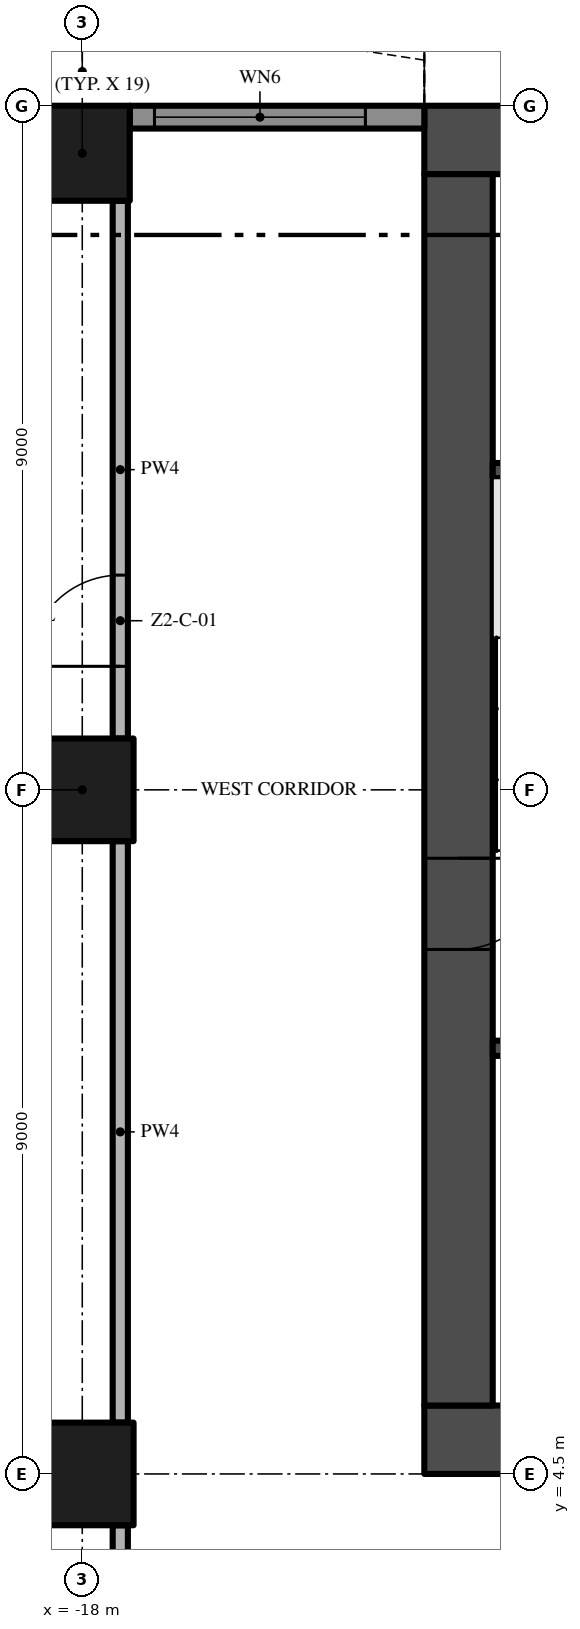
"""IFC4 building model, lengths in metres.
Left out: names, types, materials, properties, quantities, classifications, styles, units other than length and angle.
Written with IfcOpenShell. Run it as: python <this file> out.ifc"""

import sys

from ifc_helpers import new_model, si_unit, direction, frame, frame_2d, origin, origin_2d, place, context, subcontext, project, spatial, polyline, rectangle, outline, extrude, element, fill, save


model = new_model("IFC4")
c1 = context("Model", 3, precision=1e-05, world=origin(), true_north=direction((0.0, 1.0)))
c2 = subcontext(c1, "Body", "Model", "MODEL_VIEW")
j1 = project(units=[si_unit("LENGTHUNIT", "METRE"), si_unit("PLANEANGLEUNIT", "RADIAN")], contexts=[c1])
p1 = place(None, origin())
s1 = spatial("IfcSite", under=j1, at=p1, CompositionType="ELEMENT")
p2 = place(p1, origin())
s2 = spatial("IfcBuilding", under=s1, at=p2, CompositionType="ELEMENT")
p3 = place(p2, frame((0.0, 0.0, 99.8)))
s3 = spatial("IfcBuildingStorey", under=s2, at=p3, CompositionType="ELEMENT", Elevation=99.8)
p4 = place(p3, frame((-13.5, 4.95, -0.3), z_axis=(0.0, 0.0, 1.0), x_axis=(1.0, 0.0, 0.0)))
e1 = element("IfcWall", 1, at=p4, inside=s3, PredefinedType="SHEAR", context=c2, shape_type="SweptSolid", body=[
    extrude(rectangle(XDim=27.0, YDim=0.9, at=frame_2d((13.5, 0.0))), origin(), (0.0, 0.0, 1.0), 3.8),
])
p5 = place(p4, frame((12.0, 0.0, 0.3)))
e2 = element("IfcOpeningElement", 2, at=p5, cuts=e1, PredefinedType="OPENING", context=c2, shape_type="SweptSolid", body=[
    extrude(rectangle(XDim=3.0, YDim=2.4, at=frame_2d((1.5, 1.2))), frame((0.0, 0.46, 0.0), z_axis=(0.0, -1.0, 0.0), x_axis=(1.0, 0.0, 0.0)), (0.0, 0.0, 1.0), 0.92),
])
p6 = place(p4, frame((4.9, 0.0, 0.3)))
e3 = element("IfcOpeningElement", 3, at=p6, cuts=e1, PredefinedType="OPENING", context=c2, shape_type="SweptSolid", body=[
    extrude(rectangle(XDim=1.2, YDim=2.2, at=frame_2d((0.6, 1.1))), frame((0.0, 0.46, 0.0), z_axis=(0.0, -1.0, 0.0), x_axis=(1.0, 0.0, 0.0)), (0.0, 0.0, 1.0), 0.92),
])
p7 = place(p4, frame((20.75, 0.0, 0.3)))
e4 = element("IfcOpeningElement", 4, at=p7, cuts=e1, PredefinedType="OPENING", context=c2, shape_type="SweptSolid", body=[
    extrude(rectangle(XDim=1.5, YDim=2.2, at=frame_2d((0.75, 1.1))), frame((0.0, 0.46, 0.0), z_axis=(0.0, -1.0, 0.0), x_axis=(1.0, 0.0, 0.0)), (0.0, 0.0, 1.0), 0.92),
])
p8 = place(p4, frame((17.4, 0.0, 0.3)))
e5 = element("IfcOpeningElement", 5, at=p8, cuts=e1, PredefinedType="OPENING", context=c2, shape_type="SweptSolid", body=[
    extrude(rectangle(XDim=1.2, YDim=2.2, at=frame_2d((0.6, 1.1))), frame((0.0, 0.46, 0.0), z_axis=(0.0, -1.0, 0.0), x_axis=(1.0, 0.0, 0.0)), (0.0, 0.0, 1.0), 0.92),
])
p9 = place(p3, frame((13.5, 22.05, -0.3), z_axis=(0.0, 0.0, 1.0), x_axis=(-1.0, 0.0, 0.0)))
e6 = element("IfcWall", 6, at=p9, inside=s3, PredefinedType="SHEAR", context=c2, shape_type="SweptSolid", body=[
    extrude(rectangle(XDim=27.0, YDim=0.9, at=frame_2d((13.5, 0.0))), origin(), (0.0, 0.0, 1.0), 3.8),
])
p10 = place(p3, frame((-13.05, 21.6, -0.3), z_axis=(0.0, 0.0, 1.0), x_axis=(0.0, -1.0, 0.0)))
e7 = element("IfcWall", 7, at=p10, inside=s3, PredefinedType="SHEAR", context=c2, shape_type="SweptSolid", body=[
    extrude(rectangle(XDim=16.2, YDim=0.9, at=frame_2d((8.1, 0.0))), origin(), (0.0, 0.0, 1.0), 3.8),
])
p11 = place(p10, frame((9.0, 0.0, 0.3)))
e8 = element("IfcOpeningElement", 8, at=p11, cuts=e7, PredefinedType="OPENING", context=c2, shape_type="SweptSolid", body=[
    extrude(rectangle(XDim=1.2, YDim=2.2, at=frame_2d((0.6, 1.1))), frame((0.0, 0.46, 0.0), z_axis=(0.0, -1.0, 0.0), x_axis=(1.0, 0.0, 0.0)), (0.0, 0.0, 1.0), 0.92),
])
p12 = place(p3, frame((-18.0, 13.5, 0.0), z_axis=(0.0, 0.0, 1.0), x_axis=(1.0, 0.0, 0.0)))
e9 = element("IfcColumn", 9, at=p12, inside=s3, PredefinedType="COLUMN", context=c2, shape_type="SweptSolid", body=[
    extrude(rectangle(XDim=1.35, YDim=1.35, at=origin_2d()), origin(), (0.0, 0.0, 1.0), 3.5),
])
p13 = place(p3, frame((-18.0, 21.875, 0.0), z_axis=(0.0, 0.0, 1.0), x_axis=(1.0, 0.0, 0.0)))
e10 = element("IfcColumn", 10, at=p13, inside=s3, PredefinedType="COLUMN", context=c2, shape_type="SweptSolid", body=[
    extrude(rectangle(XDim=1.25, YDim=1.25, at=origin_2d()), origin(), (0.0, 0.0, 1.0), 3.5),
])
p14 = place(p3, frame((-18.0, 4.5, 0.0), z_axis=(0.0, 0.0, 1.0), x_axis=(1.0, 0.0, 0.0)))
e11 = element("IfcColumn", 11, at=p14, inside=s3, PredefinedType="COLUMN", context=c2, shape_type="SweptSolid", body=[
    extrude(rectangle(XDim=1.35, YDim=1.35, at=origin_2d()), origin(), (0.0, 0.0, 1.0), 3.5),
])
p15 = place(p3, frame((-17.375, 22.35, 0.0), z_axis=(0.0, 0.0, 1.0), x_axis=(1.0, 0.0, 0.0)))
e12 = element("IfcWall", 12, at=p15, inside=s3, PredefinedType="SOLIDWALL", context=c2, shape_type="SweptSolid", body=[
    extrude(rectangle(XDim=3.875, YDim=0.3, at=frame_2d((1.938, 0.0))), origin(), (0.0, 0.0, 1.0), 3.5),
])
p16 = place(p15, frame((0.325, 0.0, 0.45)))
e13 = element("IfcOpeningElement", 13, at=p16, cuts=e12, PredefinedType="OPENING", context=c2, shape_type="SweptSolid", body=[
    extrude(rectangle(XDim=2.775, YDim=2.65, at=frame_2d((1.387, 1.325))), frame((0.0, 0.16, 0.0), z_axis=(0.0, -1.0, 0.0), x_axis=(1.0, 0.0, 0.0)), (0.0, 0.0, 1.0), 0.32),
])
p17 = place(p3, origin())
e14 = element("IfcWall", 14, at=p17, inside=s3, PredefinedType="USERDEFINED", context=c2, shape_type="SweptSolid", body=[
    extrude(outline(polyline([(-13.5, 23.1), (-15.0, 23.329), (-16.5, 23.929), (-18.0, 24.671), (-19.5, 25.271), (-21.0, 25.5), (-22.5, 25.271), (-22.462, 25.024), (-21.0, 25.247), (-19.566, 25.028), (-18.102, 24.442), (-16.602, 23.701), (-15.066, 23.086), (-13.538, 22.853), (-13.5, 23.1)])), origin(), (0.0, 0.0, 1.0), 0.9),
])
for number, where, z_axis, x_axis in (
    (15, (-12.6, 10.1, 0.0), (0.0, 0.0, 1.0), (1.0, 0.0, 0.0)),
    (16, (-12.6, 17.7, 0.0), (0.0, 0.0, 1.0), (1.0, 0.0, 0.0)),
):
    element("IfcWall", number, at=place(p3, frame(where, z_axis=z_axis, x_axis=x_axis)), inside=s3, PredefinedType="SHEAR", context=c2, shape_type="SweptSolid", body=[
        extrude(rectangle(XDim=2.95, YDim=0.2, at=frame_2d((1.475, 0.0))), origin(), (0.0, 0.0, 1.0), 3.5),
    ])
p18 = place(p3, frame((-17.5, -0.2, 0.0), z_axis=(0.0, 0.0, 1.0), x_axis=(0.0, 1.0, 0.0)))
e17 = element("IfcWall", 17, at=p18, inside=s3, PredefinedType="PARTITIONING", context=c2, shape_type="SweptSolid", body=[
    extrude(rectangle(XDim=4.025, YDim=0.2, at=frame_2d((2.013, 0.0))), origin(), (0.0, 0.0, 1.0), 3.5),
])
p19 = place(p3, frame((-17.5, 5.175, 0.0), z_axis=(0.0, 0.0, 1.0), x_axis=(0.0, 1.0, 0.0)))
e18 = element("IfcWall", 18, at=p19, inside=s3, PredefinedType="PARTITIONING", context=c2, shape_type="SweptSolid", body=[
    extrude(rectangle(XDim=7.65, YDim=0.2, at=frame_2d((3.825, 0.0))), origin(), (0.0, 0.0, 1.0), 3.5),
])
p20 = place(p3, frame((-17.5, 14.175, 0.0), z_axis=(0.0, 0.0, 1.0), x_axis=(0.0, 1.0, 0.0)))
e19 = element("IfcWall", 19, at=p20, inside=s3, PredefinedType="PARTITIONING", context=c2, shape_type="SweptSolid", body=[
    extrude(rectangle(XDim=7.075, YDim=0.2, at=frame_2d((3.538, 0.0))), origin(), (0.0, 0.0, 1.0), 3.5),
])
p21 = place(p20, frame((0.95, 0.0, 0.0)))
e20 = element("IfcOpeningElement", 20, at=p21, cuts=e19, PredefinedType="OPENING", context=c2, shape_type="SweptSolid", body=[
    extrude(rectangle(XDim=1.2, YDim=2.4, at=frame_2d((0.6, 1.2))), frame((0.0, 0.11, 0.0), z_axis=(0.0, -1.0, 0.0), x_axis=(1.0, 0.0, 0.0)), (0.0, 0.0, 1.0), 0.22),
])
p22 = place(p16, origin())
e21 = element("IfcWindow", 21, at=p22, inside=s3, PartitioningType="SINGLE_PANEL", PredefinedType="WINDOW", context=c2, shape_type="SweptSolid", body=[
    extrude(rectangle(XDim=2.775, YDim=2.65, at=frame_2d((1.387, 1.325))), frame((0.0, 0.03, 0.0), z_axis=(0.0, -1.0, 0.0), x_axis=(1.0, 0.0, 0.0)), (0.0, 0.0, 1.0), 0.06),
])
fill(e13, e21)
p23 = place(p11, frame((1.2, 0.0, 0.0), z_axis=(0.0, 0.0, 1.0), x_axis=(-1.0, 0.0, 0.0)))
e22 = element("IfcDoor", 22, at=p23, inside=s3, OperationType="SINGLE_SWING_RIGHT", PredefinedType="DOOR", context=c2, shape_type="SweptSolid", body=[
    extrude(rectangle(XDim=1.2, YDim=2.2, at=frame_2d((0.6, 1.1))), frame((0.0, 0.025, 0.0), z_axis=(0.0, -1.0, 0.0), x_axis=(1.0, 0.0, 0.0)), (0.0, 0.0, 1.0), 0.05),
])
fill(e8, e22)
p24 = place(p21, origin())
e23 = element("IfcDoor", 23, at=p24, inside=s3, OperationType="SINGLE_SWING_LEFT", PredefinedType="DOOR", context=c2, shape_type="SweptSolid", body=[
    extrude(rectangle(XDim=1.2, YDim=2.4, at=frame_2d((0.6, 1.2))), frame((0.0, 0.025, 0.0), z_axis=(0.0, -1.0, 0.0), x_axis=(1.0, 0.0, 0.0)), (0.0, 0.0, 1.0), 0.05),
])
fill(e20, e23)
save(model, sys.argv[1])
